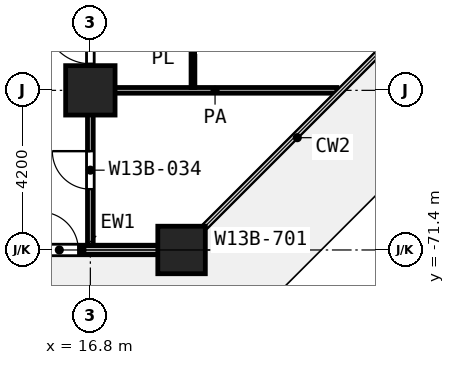
"""IFC4 building model, lengths in metres.
Left out: names, types, materials, properties, quantities, classifications, styles, units other than length and angle.
Written with IfcOpenShell. Run it as: python <this file> out.ifc"""

import sys

from ifc_helpers import new_model, si_unit, direction, frame, frame_2d, origin, origin_2d, place, context, subcontext, project, spatial, rectangle, extrude, element, fill, save


model = new_model("IFC4")
c1 = context("Model", 3, precision=1e-05, world=origin(), true_north=direction((0.0, 1.0)))
c2 = subcontext(c1, "Body", "Model", "MODEL_VIEW")
j1 = project(units=[si_unit("LENGTHUNIT", "METRE"), si_unit("PLANEANGLEUNIT", "RADIAN")], contexts=[c1])
p1 = place(None, origin())
s1 = spatial("IfcSite", under=j1, at=p1, CompositionType="ELEMENT")
p2 = place(p1, origin())
s2 = spatial("IfcBuilding", under=s1, at=p2, CompositionType="ELEMENT")
p3 = place(p2, frame((0.0, 0.0, 89.6)))
s3 = spatial("IfcBuildingStorey", under=s2, at=p3, CompositionType="ELEMENT", Elevation=89.6)
p4 = place(p3, frame((16.8, -67.2, 0.0), z_axis=(0.0, 0.0, 1.0), x_axis=(1.0, 0.0, 0.0)))
e1 = element("IfcColumn", 1, at=p4, inside=s3, PredefinedType="COLUMN", context=c2, shape_type="SweptSolid", body=[
    extrude(rectangle(XDim=1.3, YDim=1.3, at=origin_2d()), origin(), (0.0, 0.0, 1.0), 4.2),
])
p5 = place(p3, frame((19.2, -71.4, 0.0), z_axis=(0.0, 0.0, 1.0), x_axis=(1.0, 0.0, 0.0)))
e2 = element("IfcColumn", 2, at=p5, inside=s3, PredefinedType="COLUMN", context=c2, shape_type="SweptSolid", body=[
    extrude(rectangle(XDim=1.25, YDim=1.25, at=origin_2d()), origin(), (0.0, 0.0, 1.0), 4.2),
])
p6 = place(p3, frame((14.592, -71.4, 0.0), z_axis=(0.0, 0.0, 1.0), x_axis=(1.0, 0.0, 0.0)))
e3 = element("IfcWall", 3, at=p6, inside=s3, PredefinedType="SOLIDWALL", context=c2, shape_type="SweptSolid", body=[
    extrude(rectangle(XDim=3.983, YDim=0.25, at=frame_2d((1.992, 0.0))), origin(), (0.0, 0.0, 1.0), 3.58),
])
p7 = place(p6, frame((0.892, 0.0, 0.0)))
e4 = element("IfcOpeningElement", 4, at=p7, cuts=e3, PredefinedType="OPENING", context=c2, shape_type="SweptSolid", body=[
    extrude(rectangle(XDim=1.0, YDim=2.1, at=frame_2d((0.5, 1.05))), frame((0.0, 0.135, 0.0), z_axis=(0.0, -1.0, 0.0), x_axis=(1.0, 0.0, 0.0)), (0.0, 0.0, 1.0), 0.27),
])
p8 = place(p3, frame((19.5, -67.125, 0.0), z_axis=(0.0, 0.0, 1.0), x_axis=(0.0, 1.0, 0.0)))
e5 = element("IfcWall", 5, at=p8, inside=s3, PredefinedType="PARTITIONING", context=c2, shape_type="SweptSolid", body=[
    extrude(rectangle(XDim=2.025, YDim=0.1, at=frame_2d((1.012, 0.0))), origin(), (0.0, 0.0, 1.0), 3.7),
])
p9 = place(p3, frame((16.875, -67.2, 0.0), z_axis=(0.0, 0.0, 1.0), x_axis=(1.0, 0.0, 0.0)))
e6 = element("IfcWall", 6, at=p9, inside=s3, PredefinedType="PARTITIONING", context=c2, shape_type="SweptSolid", body=[
    extrude(rectangle(XDim=6.412, YDim=0.15, at=frame_2d((3.206, 0.0))), origin(), (0.0, 0.0, 1.0), 3.7),
])
p10 = place(p3, frame((16.8, -71.32, 0.0), z_axis=(0.0, 0.0, 1.0), x_axis=(0.0, 1.0, 0.0)))
e7 = element("IfcWall", 7, at=p10, inside=s3, PredefinedType="PARTITIONING", context=c2, shape_type="SweptSolid", body=[
    extrude(rectangle(XDim=11.868, YDim=0.15, at=frame_2d((5.934, 0.0))), origin(), (0.0, 0.0, 1.0), 3.7),
])
p11 = place(p10, frame((8.77, 0.0, 0.0)))
e8 = element("IfcOpeningElement", 8, at=p11, cuts=e7, PredefinedType="OPENING", context=c2, shape_type="SweptSolid", body=[
    extrude(rectangle(XDim=1.2, YDim=2.1, at=frame_2d((0.6, 1.05))), frame((0.0, 0.085, 0.0), z_axis=(0.0, -1.0, 0.0), x_axis=(1.0, 0.0, 0.0)), (0.0, 0.0, 1.0), 0.17),
])
p12 = place(p10, frame((7.22, 0.0, 0.0)))
e9 = element("IfcOpeningElement", 9, at=p12, cuts=e7, PredefinedType="OPENING", context=c2, shape_type="SweptSolid", body=[
    extrude(rectangle(XDim=1.2, YDim=2.1, at=frame_2d((0.6, 1.05))), frame((0.0, 0.085, 0.0), z_axis=(0.0, -1.0, 0.0), x_axis=(1.0, 0.0, 0.0)), (0.0, 0.0, 1.0), 0.17),
])
p13 = place(p10, frame((4.82, 0.0, 0.0)))
e10 = element("IfcOpeningElement", 10, at=p13, cuts=e7, PredefinedType="OPENING", context=c2, shape_type="SweptSolid", body=[
    extrude(rectangle(XDim=1.2, YDim=2.1, at=frame_2d((0.6, 1.05))), frame((0.0, 0.085, 0.0), z_axis=(0.0, -1.0, 0.0), x_axis=(1.0, 0.0, 0.0)), (0.0, 0.0, 1.0), 0.17),
])
p14 = place(p10, frame((1.52, 0.0, 0.0)))
e11 = element("IfcOpeningElement", 11, at=p14, cuts=e7, PredefinedType="OPENING", context=c2, shape_type="SweptSolid", body=[
    extrude(rectangle(XDim=1.0, YDim=2.1, at=frame_2d((0.5, 1.05))), frame((0.0, 0.085, 0.0), z_axis=(0.0, -1.0, 0.0), x_axis=(1.0, 0.0, 0.0)), (0.0, 0.0, 1.0), 0.17),
])
p15 = place(p7, origin())
e12 = element("IfcDoor", 12, at=p15, inside=s3, OperationType="SINGLE_SWING_LEFT", PredefinedType="DOOR", context=c2, shape_type="SweptSolid", body=[
    extrude(rectangle(XDim=1.0, YDim=2.1, at=frame_2d((0.5, 1.05))), frame((0.0, 0.025, 0.0), z_axis=(0.0, -1.0, 0.0), x_axis=(1.0, 0.0, 0.0)), (0.0, 0.0, 1.0), 0.05),
])
fill(e4, e12)
p16 = place(p13, origin())
e13 = element("IfcDoor", 13, at=p16, inside=s3, OperationType="SINGLE_SWING_RIGHT", PredefinedType="DOOR", context=c2, shape_type="SweptSolid", body=[
    extrude(rectangle(XDim=1.2, YDim=2.1, at=frame_2d((0.6, 1.05))), frame((0.0, 0.025, 0.0), z_axis=(0.0, -1.0, 0.0), x_axis=(1.0, 0.0, 0.0)), (0.0, 0.0, 1.0), 0.05),
])
fill(e10, e13)
p17 = place(p14, origin())
e14 = element("IfcDoor", 14, at=p17, inside=s3, OperationType="SINGLE_SWING_RIGHT", PredefinedType="DOOR", context=c2, shape_type="SweptSolid", body=[
    extrude(rectangle(XDim=1.0, YDim=2.1, at=frame_2d((0.5, 1.05))), frame((0.0, 0.025, 0.0), z_axis=(0.0, -1.0, 0.0), x_axis=(1.0, 0.0, 0.0)), (0.0, 0.0, 1.0), 0.05),
])
fill(e11, e14)
save(model, sys.argv[1])
